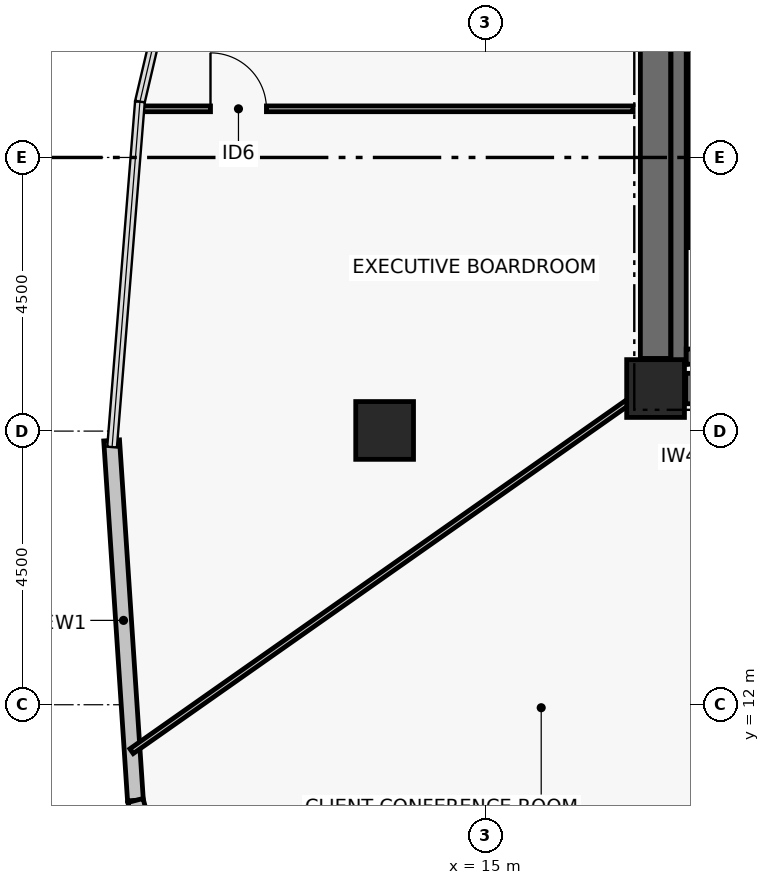
"""IFC4 building model, lengths in metres.
Left out: names, types, materials, properties, quantities, classifications, styles, units other than length and angle.
Written with IfcOpenShell. Run it as: python <this file> out.ifc"""

import sys

from ifc_helpers import new_model, si_unit, direction, frame, frame_2d, origin, origin_2d, place, context, subcontext, project, spatial, rectangle, hollow_rectangle, extrude, element, fill, save


model = new_model("IFC4")
c1 = context("Model", 3, precision=1e-05, world=origin(), true_north=direction((0.0, 1.0)))
c2 = subcontext(c1, "Body", "Model", "MODEL_VIEW")
j1 = project(units=[si_unit("LENGTHUNIT", "METRE"), si_unit("PLANEANGLEUNIT", "RADIAN")], contexts=[c1])
p1 = place(None, origin())
s1 = spatial("IfcSite", under=j1, at=p1, CompositionType="ELEMENT")
p2 = place(p1, origin())
s2 = spatial("IfcBuilding", under=s1, at=p2, CompositionType="ELEMENT")
p3 = place(p2, frame((0.0, 0.0, 176.64)))
s3 = spatial("IfcBuildingStorey", under=s2, at=p3, CompositionType="ELEMENT", Elevation=176.64)
p4 = place(p3, frame((17.8, 17.2, 0.0), z_axis=(0.0, 0.0, 1.0), x_axis=(1.0, 0.0, 0.0)))
e1 = element("IfcColumn", 1, at=p4, inside=s3, PredefinedType="COLUMN", context=c2, shape_type="SweptSolid", body=[
    extrude(rectangle(XDim=0.95, YDim=0.95, at=origin_2d()), origin(), (0.0, 0.0, 1.0), 3.72),
])
p5 = place(p3, frame((18.295, 17.2, 0.0), z_axis=(0.0, 0.0, 1.0), x_axis=(1.0, 0.0, 0.0)))
e2 = element("IfcWall", 2, at=p5, inside=s3, PredefinedType="SHEAR", context=c2, shape_type="SweptSolid", body=[
    extrude(rectangle(XDim=3.26, YDim=0.5, at=frame_2d((1.63, 0.0))), origin(), (0.0, 0.0, 1.0), 3.5),
])
p6 = place(p3, frame((17.8, 17.695, 0.0), z_axis=(0.0, 0.0, 1.0), x_axis=(0.0, 1.0, 0.0)))
e3 = element("IfcWall", 3, at=p6, inside=s3, PredefinedType="SHEAR", context=c2, shape_type="SweptSolid", body=[
    extrude(rectangle(XDim=8.61, YDim=0.5, at=frame_2d((4.305, 0.0))), origin(), (0.0, 0.0, 1.0), 3.5),
])
p7 = place(p3, frame((18.179, 17.6, 0.0), z_axis=(0.0, 0.0, 1.0), x_axis=(0.0, 1.0, 0.0)))
e4 = element("IfcWall", 4, at=p7, inside=s3, PredefinedType="SHEAR", context=c2, shape_type="SweptSolid", body=[
    extrude(rectangle(XDim=8.8, YDim=0.25, at=frame_2d((4.4, 0.0))), origin(), (0.0, 0.0, 1.0), 3.5),
])
p8 = place(p3, frame((18.304, 17.725, 0.0), z_axis=(0.0, 0.0, 1.0), x_axis=(1.0, 0.0, 0.0)))
e5 = element("IfcWall", 5, at=p8, inside=s3, PredefinedType="SHEAR", context=c2, shape_type="SweptSolid", body=[
    extrude(rectangle(XDim=3.496, YDim=0.25, at=frame_2d((1.748, 0.0))), origin(), (0.0, 0.0, 1.0), 3.5),
])
p9 = place(p3, frame((13.344, 16.511, 0.0), z_axis=(0.0, 0.0, 1.0), x_axis=(1.0, 0.0, 0.0)))
e6 = element("IfcColumn", 6, at=p9, inside=s3, PredefinedType="COLUMN", context=c2, shape_type="SweptSolid", body=[
    extrude(hollow_rectangle(XDim=0.95, YDim=0.95, WallThickness=0.04, at=origin_2d()), origin(), (0.0, 0.0, 1.0), 3.72),
])
p10 = place(p3, frame((9.246, 10.428, 0.0), z_axis=(0.0, 0.0, 1.0), x_axis=(-0.065934416021, 0.997823958814, 0.0)))
e7 = element("IfcWall", 7, at=p10, inside=s3, PredefinedType="PARTITIONING", context=c2, shape_type="SweptSolid", body=[
    extrude(rectangle(XDim=5.932, YDim=0.26, at=frame_2d((2.966, 0.0))), origin(), (0.0, 0.0, 1.0), 3.5),
])
p11 = place(p3, frame((9.963, 7.669, 0.0), z_axis=(0.0, 0.0, 1.0), x_axis=(-0.251601733001, 0.967830857098, 0.0)))
e8 = element("IfcWall", 8, at=p11, inside=s3, PredefinedType="PARTITIONING", context=c2, shape_type="SweptSolid", body=[
    extrude(rectangle(XDim=2.848, YDim=0.26, at=frame_2d((1.424, 0.0))), origin(), (0.0, 0.0, 1.0), 3.5),
])
p12 = place(p3, frame((9.3, 21.8, 0.0), z_axis=(0.0, 0.0, 1.0), x_axis=(1.0, 0.0, 0.0)))
e9 = element("IfcWall", 9, at=p12, inside=s3, PredefinedType="PARTITIONING", context=c2, shape_type="SweptSolid", body=[
    extrude(rectangle(XDim=8.13, YDim=0.095, at=frame_2d((4.065, 0.0))), origin(), (0.0, 0.0, 1.0), 2.63),
])
p13 = place(p12, frame((1.18, 0.0, 0.0)))
e10 = element("IfcOpeningElement", 10, at=p13, cuts=e9, PredefinedType="OPENING", context=c2, shape_type="SweptSolid", body=[
    extrude(rectangle(XDim=0.92, YDim=2.05, at=frame_2d((0.46, 1.025))), frame((0.0, 0.057, 0.0), z_axis=(0.0, -1.0, 0.0), x_axis=(1.0, 0.0, 0.0)), (0.0, 0.0, 1.0), 0.115),
])
p14 = place(p3, frame((9.182, 11.236, 0.0), z_axis=(0.0, 0.0, 1.0), x_axis=(0.818184922636, 0.574955156835, 0.0)))
e11 = element("IfcWall", 11, at=p14, inside=s3, PredefinedType="PARTITIONING", context=c2, shape_type="SweptSolid", body=[
    extrude(rectangle(XDim=10.081, YDim=0.095, at=frame_2d((5.04, 0.0))), origin(), (0.0, 0.0, 1.0), 2.63),
])
p15 = place(p13, origin())
e12 = element("IfcDoor", 12, at=p15, inside=s3, OperationType="SINGLE_SWING_LEFT", PredefinedType="DOOR", context=c2, shape_type="SweptSolid", body=[
    extrude(rectangle(XDim=0.92, YDim=2.05, at=frame_2d((0.46, 1.025))), frame((0.0, 0.025, 0.0), z_axis=(0.0, -1.0, 0.0), x_axis=(1.0, 0.0, 0.0)), (0.0, 0.0, 1.0), 0.05),
])
fill(e10, e12)
save(model, sys.argv[1])
